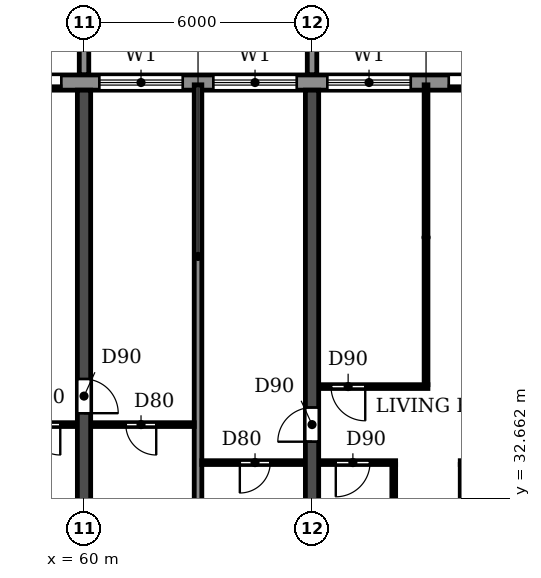
"""IFC4 building model, lengths in metres.
Left out: names, types, materials, properties, quantities, classifications, styles, units other than length and angle.
Written with IfcOpenShell. Run it as: python <this file> out.ifc"""

import sys

from ifc_helpers import new_model, si_unit, direction, frame, frame_2d, origin, place, context, subcontext, project, spatial, polyline, rectangle, outline, extrude, source, transform, mapped, element, fill, save


model = new_model("IFC4")
c1 = context("Model", 3, precision=1e-05, world=origin(), true_north=direction((0.0, 1.0)))
c2 = subcontext(c1, "Body", "Model", "MODEL_VIEW")
j1 = project(units=[si_unit("LENGTHUNIT", "METRE"), si_unit("PLANEANGLEUNIT", "RADIAN")], contexts=[c1])
p1 = place(None, origin())
s1 = spatial("IfcSite", under=j1, at=p1, CompositionType="ELEMENT")
p2 = place(p1, origin())
s2 = spatial("IfcBuilding", under=s1, at=p2, CompositionType="ELEMENT")
p3 = place(p2, frame((0.0, 0.0, 76.2)))
s3 = spatial("IfcBuildingStorey", under=s2, at=p3, CompositionType="ELEMENT", Elevation=76.2)
p4 = place(p3, frame((60.0, 30.525, 0.0), z_axis=(0.0, 0.0, 1.0), x_axis=(0.0, 1.0, 0.0)))
e1 = element("IfcWall", 1, at=p4, inside=s3, PredefinedType="SHEAR", context=c2, shape_type="SweptSolid", body=[
    extrude(rectangle(XDim=12.875, YDim=0.35, at=frame_2d((6.438, 0.0))), origin(), (0.0, 0.0, 1.0), 3.06),
])
p5 = place(p4, frame((4.375, 0.0, 0.0)))
e2 = element("IfcOpeningElement", 2, at=p5, cuts=e1, PredefinedType="OPENING", context=c2, shape_type="SweptSolid", body=[
    extrude(rectangle(XDim=0.9, YDim=2.1, at=frame_2d((0.45, 1.05))), frame((0.0, 0.185, 0.0), z_axis=(0.0, -1.0, 0.0), x_axis=(1.0, 0.0, 0.0)), (0.0, 0.0, 1.0), 0.37),
])
p6 = place(p3, frame((66.0, 30.525, 0.0), z_axis=(0.0, 0.0, 1.0), x_axis=(0.0, 1.0, 0.0)))
e3 = element("IfcWall", 3, at=p6, inside=s3, PredefinedType="SHEAR", context=c2, shape_type="SweptSolid", body=[
    extrude(rectangle(XDim=12.875, YDim=0.35, at=frame_2d((6.438, 0.0))), origin(), (0.0, 0.0, 1.0), 3.06),
])
p7 = place(p6, frame((3.625, 0.0, 0.0)))
e4 = element("IfcOpeningElement", 4, at=p7, cuts=e3, PredefinedType="OPENING", context=c2, shape_type="SweptSolid", body=[
    extrude(rectangle(XDim=0.9, YDim=2.1, at=frame_2d((0.45, 1.05))), frame((0.0, 0.185, 0.0), z_axis=(0.0, -1.0, 0.0), x_axis=(1.0, 0.0, 0.0)), (0.0, 0.0, 1.0), 0.37),
])
p8 = place(p3, frame((91.317, 43.6, 0.0), z_axis=(0.0, 0.0, 1.0), x_axis=(-1.0, 0.0, 0.0)))
e5 = element("IfcWall", 5, at=p8, inside=s3, PredefinedType="STANDARD", context=c2, shape_type="SweptSolid", body=[
    extrude(rectangle(XDim=80.634, YDim=0.4, at=frame_2d((40.317, 0.0))), origin(), (0.0, 0.0, 1.0), 3.06),
])
p9 = place(p8, frame((76.717, 0.0, 0.9)))
e6 = element("IfcOpeningElement", 6, at=p9, cuts=e5, PredefinedType="OPENING", context=c2, shape_type="SweptSolid", body=[
    extrude(rectangle(XDim=2.2, YDim=1.5, at=frame_2d((1.1, 0.75))), frame((0.0, 0.21, 0.0), z_axis=(0.0, -1.0, 0.0), x_axis=(1.0, 0.0, 0.0)), (0.0, 0.0, 1.0), 0.42),
])
p10 = place(p8, frame((73.917, 0.0, 0.0)))
e7 = element("IfcOpeningElement", 7, at=p10, cuts=e5, PredefinedType="OPENING", context=c2, shape_type="SweptSolid", body=[
    extrude(rectangle(XDim=1.8, YDim=2.4, at=frame_2d((0.9, 1.2))), frame((0.0, 0.21, 0.0), z_axis=(0.0, -1.0, 0.0), x_axis=(1.0, 0.0, 0.0)), (0.0, 0.0, 1.0), 0.42),
])
p11 = place(p8, frame((70.917, 0.0, 0.0)))
e8 = element("IfcOpeningElement", 8, at=p11, cuts=e5, PredefinedType="OPENING", context=c2, shape_type="SweptSolid", body=[
    extrude(rectangle(XDim=1.8, YDim=2.4, at=frame_2d((0.9, 1.2))), frame((0.0, 0.21, 0.0), z_axis=(0.0, -1.0, 0.0), x_axis=(1.0, 0.0, 0.0)), (0.0, 0.0, 1.0), 0.42),
])
p12 = place(p8, frame((67.717, 0.0, 0.9)))
e9 = element("IfcOpeningElement", 9, at=p12, cuts=e5, PredefinedType="OPENING", context=c2, shape_type="SweptSolid", body=[
    extrude(rectangle(XDim=2.2, YDim=1.5, at=frame_2d((1.1, 0.75))), frame((0.0, 0.21, 0.0), z_axis=(0.0, -1.0, 0.0), x_axis=(1.0, 0.0, 0.0)), (0.0, 0.0, 1.0), 0.42),
])
p13 = place(p8, frame((64.717, 0.0, 0.9)))
e10 = element("IfcOpeningElement", 10, at=p13, cuts=e5, PredefinedType="OPENING", context=c2, shape_type="SweptSolid", body=[
    extrude(rectangle(XDim=2.2, YDim=1.5, at=frame_2d((1.1, 0.75))), frame((0.0, 0.21, 0.0), z_axis=(0.0, -1.0, 0.0), x_axis=(1.0, 0.0, 0.0)), (0.0, 0.0, 1.0), 0.42),
])
p14 = place(p8, frame((61.917, 0.0, 0.0)))
e11 = element("IfcOpeningElement", 11, at=p14, cuts=e5, PredefinedType="OPENING", context=c2, shape_type="SweptSolid", body=[
    extrude(rectangle(XDim=1.8, YDim=2.4, at=frame_2d((0.9, 1.2))), frame((0.0, 0.21, 0.0), z_axis=(0.0, -1.0, 0.0), x_axis=(1.0, 0.0, 0.0)), (0.0, 0.0, 1.0), 0.42),
])
p15 = place(p8, frame((58.717, 0.0, 0.9)))
e12 = element("IfcOpeningElement", 12, at=p15, cuts=e5, PredefinedType="OPENING", context=c2, shape_type="SweptSolid", body=[
    extrude(rectangle(XDim=2.2, YDim=1.5, at=frame_2d((1.1, 0.75))), frame((0.0, 0.21, 0.0), z_axis=(0.0, -1.0, 0.0), x_axis=(1.0, 0.0, 0.0)), (0.0, 0.0, 1.0), 0.42),
])
p16 = place(p8, frame((55.917, 0.0, 0.0)))
e13 = element("IfcOpeningElement", 13, at=p16, cuts=e5, PredefinedType="OPENING", context=c2, shape_type="SweptSolid", body=[
    extrude(rectangle(XDim=1.8, YDim=2.4, at=frame_2d((0.9, 1.2))), frame((0.0, 0.21, 0.0), z_axis=(0.0, -1.0, 0.0), x_axis=(1.0, 0.0, 0.0)), (0.0, 0.0, 1.0), 0.42),
])
p17 = place(p8, frame((52.717, 0.0, 0.9)))
e14 = element("IfcOpeningElement", 14, at=p17, cuts=e5, PredefinedType="OPENING", context=c2, shape_type="SweptSolid", body=[
    extrude(rectangle(XDim=2.2, YDim=1.5, at=frame_2d((1.1, 0.75))), frame((0.0, 0.21, 0.0), z_axis=(0.0, -1.0, 0.0), x_axis=(1.0, 0.0, 0.0)), (0.0, 0.0, 1.0), 0.42),
])
p18 = place(p8, frame((49.717, 0.0, 0.9)))
e15 = element("IfcOpeningElement", 15, at=p18, cuts=e5, PredefinedType="OPENING", context=c2, shape_type="SweptSolid", body=[
    extrude(rectangle(XDim=2.2, YDim=1.5, at=frame_2d((1.1, 0.75))), frame((0.0, 0.21, 0.0), z_axis=(0.0, -1.0, 0.0), x_axis=(1.0, 0.0, 0.0)), (0.0, 0.0, 1.0), 0.42),
])
p19 = place(p8, frame((46.917, 0.0, 0.0)))
e16 = element("IfcOpeningElement", 16, at=p19, cuts=e5, PredefinedType="OPENING", context=c2, shape_type="SweptSolid", body=[
    extrude(rectangle(XDim=1.8, YDim=2.4, at=frame_2d((0.9, 1.2))), frame((0.0, 0.21, 0.0), z_axis=(0.0, -1.0, 0.0), x_axis=(1.0, 0.0, 0.0)), (0.0, 0.0, 1.0), 0.42),
])
p20 = place(p8, frame((43.717, 0.0, 0.9)))
e17 = element("IfcOpeningElement", 17, at=p20, cuts=e5, PredefinedType="OPENING", context=c2, shape_type="SweptSolid", body=[
    extrude(rectangle(XDim=2.2, YDim=1.5, at=frame_2d((1.1, 0.75))), frame((0.0, 0.21, 0.0), z_axis=(0.0, -1.0, 0.0), x_axis=(1.0, 0.0, 0.0)), (0.0, 0.0, 1.0), 0.42),
])
p21 = place(p8, frame((40.717, 0.0, 0.9)))
e18 = element("IfcOpeningElement", 18, at=p21, cuts=e5, PredefinedType="OPENING", context=c2, shape_type="SweptSolid", body=[
    extrude(rectangle(XDim=2.2, YDim=1.5, at=frame_2d((1.1, 0.75))), frame((0.0, 0.21, 0.0), z_axis=(0.0, -1.0, 0.0), x_axis=(1.0, 0.0, 0.0)), (0.0, 0.0, 1.0), 0.42),
])
p22 = place(p8, frame((37.917, 0.0, 0.0)))
e19 = element("IfcOpeningElement", 19, at=p22, cuts=e5, PredefinedType="OPENING", context=c2, shape_type="SweptSolid", body=[
    extrude(rectangle(XDim=1.8, YDim=2.4, at=frame_2d((0.9, 1.2))), frame((0.0, 0.21, 0.0), z_axis=(0.0, -1.0, 0.0), x_axis=(1.0, 0.0, 0.0)), (0.0, 0.0, 1.0), 0.42),
])
p23 = place(p8, frame((34.717, 0.0, 0.9)))
e20 = element("IfcOpeningElement", 20, at=p23, cuts=e5, PredefinedType="OPENING", context=c2, shape_type="SweptSolid", body=[
    extrude(rectangle(XDim=2.2, YDim=1.5, at=frame_2d((1.1, 0.75))), frame((0.0, 0.21, 0.0), z_axis=(0.0, -1.0, 0.0), x_axis=(1.0, 0.0, 0.0)), (0.0, 0.0, 1.0), 0.42),
])
p24 = place(p8, frame((31.917, 0.0, 0.0)))
e21 = element("IfcOpeningElement", 21, at=p24, cuts=e5, PredefinedType="OPENING", context=c2, shape_type="SweptSolid", body=[
    extrude(rectangle(XDim=1.8, YDim=2.4, at=frame_2d((0.9, 1.2))), frame((0.0, 0.21, 0.0), z_axis=(0.0, -1.0, 0.0), x_axis=(1.0, 0.0, 0.0)), (0.0, 0.0, 1.0), 0.42),
])
p25 = place(p8, frame((28.717, 0.0, 0.9)))
e22 = element("IfcOpeningElement", 22, at=p25, cuts=e5, PredefinedType="OPENING", context=c2, shape_type="SweptSolid", body=[
    extrude(rectangle(XDim=2.2, YDim=1.5, at=frame_2d((1.1, 0.75))), frame((0.0, 0.21, 0.0), z_axis=(0.0, -1.0, 0.0), x_axis=(1.0, 0.0, 0.0)), (0.0, 0.0, 1.0), 0.42),
])
p26 = place(p8, frame((25.717, 0.0, 0.9)))
e23 = element("IfcOpeningElement", 23, at=p26, cuts=e5, PredefinedType="OPENING", context=c2, shape_type="SweptSolid", body=[
    extrude(rectangle(XDim=2.2, YDim=1.5, at=frame_2d((1.1, 0.75))), frame((0.0, 0.21, 0.0), z_axis=(0.0, -1.0, 0.0), x_axis=(1.0, 0.0, 0.0)), (0.0, 0.0, 1.0), 0.42),
])
p27 = place(p8, frame((22.717, 0.0, 0.9)))
e24 = element("IfcOpeningElement", 24, at=p27, cuts=e5, PredefinedType="OPENING", context=c2, shape_type="SweptSolid", body=[
    extrude(rectangle(XDim=2.2, YDim=1.5, at=frame_2d((1.1, 0.75))), frame((0.0, 0.21, 0.0), z_axis=(0.0, -1.0, 0.0), x_axis=(1.0, 0.0, 0.0)), (0.0, 0.0, 1.0), 0.42),
])
p28 = place(p8, frame((19.917, 0.0, 0.0)))
e25 = element("IfcOpeningElement", 25, at=p28, cuts=e5, PredefinedType="OPENING", context=c2, shape_type="SweptSolid", body=[
    extrude(rectangle(XDim=1.8, YDim=2.4, at=frame_2d((0.9, 1.2))), frame((0.0, 0.21, 0.0), z_axis=(0.0, -1.0, 0.0), x_axis=(1.0, 0.0, 0.0)), (0.0, 0.0, 1.0), 0.42),
])
p29 = place(p8, frame((16.717, 0.0, 0.9)))
e26 = element("IfcOpeningElement", 26, at=p29, cuts=e5, PredefinedType="OPENING", context=c2, shape_type="SweptSolid", body=[
    extrude(rectangle(XDim=2.2, YDim=1.5, at=frame_2d((1.1, 0.75))), frame((0.0, 0.21, 0.0), z_axis=(0.0, -1.0, 0.0), x_axis=(1.0, 0.0, 0.0)), (0.0, 0.0, 1.0), 0.42),
])
p30 = place(p8, frame((13.717, 0.0, 0.9)))
e27 = element("IfcOpeningElement", 27, at=p30, cuts=e5, PredefinedType="OPENING", context=c2, shape_type="SweptSolid", body=[
    extrude(rectangle(XDim=2.2, YDim=1.5, at=frame_2d((1.1, 0.75))), frame((0.0, 0.21, 0.0), z_axis=(0.0, -1.0, 0.0), x_axis=(1.0, 0.0, 0.0)), (0.0, 0.0, 1.0), 0.42),
])
p31 = place(p8, frame((10.717, 0.0, 0.9)))
e28 = element("IfcOpeningElement", 28, at=p31, cuts=e5, PredefinedType="OPENING", context=c2, shape_type="SweptSolid", body=[
    extrude(rectangle(XDim=2.2, YDim=1.5, at=frame_2d((1.1, 0.75))), frame((0.0, 0.21, 0.0), z_axis=(0.0, -1.0, 0.0), x_axis=(1.0, 0.0, 0.0)), (0.0, 0.0, 1.0), 0.42),
])
p32 = place(p8, frame((7.917, 0.0, 0.0)))
e29 = element("IfcOpeningElement", 29, at=p32, cuts=e5, PredefinedType="OPENING", context=c2, shape_type="SweptSolid", body=[
    extrude(rectangle(XDim=1.8, YDim=2.4, at=frame_2d((0.9, 1.2))), frame((0.0, 0.21, 0.0), z_axis=(0.0, -1.0, 0.0), x_axis=(1.0, 0.0, 0.0)), (0.0, 0.0, 1.0), 0.42),
])
p33 = place(p8, frame((4.717, 0.0, 0.9)))
e30 = element("IfcOpeningElement", 30, at=p33, cuts=e5, PredefinedType="OPENING", context=c2, shape_type="SweptSolid", body=[
    extrude(rectangle(XDim=2.2, YDim=1.5, at=frame_2d((1.1, 0.75))), frame((0.0, 0.21, 0.0), z_axis=(0.0, -1.0, 0.0), x_axis=(1.0, 0.0, 0.0)), (0.0, 0.0, 1.0), 0.42),
])
p34 = place(p8, frame((1.917, 0.0, 0.0)))
e31 = element("IfcOpeningElement", 31, at=p34, cuts=e5, PredefinedType="OPENING", context=c2, shape_type="SweptSolid", body=[
    extrude(rectangle(XDim=1.8, YDim=2.4, at=frame_2d((0.9, 1.2))), frame((0.0, 0.21, 0.0), z_axis=(0.0, -1.0, 0.0), x_axis=(1.0, 0.0, 0.0)), (0.0, 0.0, 1.0), 0.42),
])
m1 = source(origin(), c2, "Body", "SweptSolid", [
    extrude(outline(polyline([(0.0, 0.0), (0.25, 0.0), (0.25, 3.1), (0.0, 3.1), (0.0, 0.0)])), origin(), (0.0, 0.0, 1.0), 3.1),
])
for number, where in (
    (32, (59.875, 43.8, 0.0)),
    (33, (65.875, 43.8, 0.0)),
):
    element("IfcWall", number, at=place(p3, frame(where)), inside=s3, PredefinedType="STANDARD", context=c2, shape_type="MappedRepresentation", body=[
        mapped(m1, transform((0.0, 0.0, 0.0))),
    ])
p35 = place(p3, frame((63.0, 30.535, 0.0), z_axis=(0.0, 0.0, 1.0), x_axis=(0.0, 1.0, 0.0)))
e34 = element("IfcWall", 34, at=p35, inside=s3, PredefinedType="PARTITIONING", context=c2, shape_type="SweptSolid", body=[
    extrude(rectangle(XDim=13.005, YDim=0.2, at=frame_2d((6.502, 0.0))), origin(), (0.0, 0.0, 1.0), 3.06),
])
p36 = place(p3, frame((63.1, 33.6, 0.0), z_axis=(0.0, 0.0, 1.0), x_axis=(1.0, 0.0, 0.0)))
e35 = element("IfcWall", 35, at=p36, inside=s3, PredefinedType="PARTITIONING", context=c2, shape_type="SweptSolid", body=[
    extrude(rectangle(XDim=2.715, YDim=0.1, at=frame_2d((1.357, 0.0))), origin(), (0.0, 0.0, 1.0), 3.06),
])
p37 = place(p36, frame((1.0, 0.0, 0.0)))
e36 = element("IfcOpeningElement", 36, at=p37, cuts=e35, PredefinedType="OPENING", context=c2, shape_type="SweptSolid", body=[
    extrude(rectangle(XDim=0.8, YDim=2.1, at=frame_2d((0.4, 1.05))), frame((0.0, 0.06, 0.0), z_axis=(0.0, -1.0, 0.0), x_axis=(1.0, 0.0, 0.0)), (0.0, 0.0, 1.0), 0.12),
])
p38 = place(p3, frame((66.185, 33.6, 0.0), z_axis=(0.0, 0.0, 1.0), x_axis=(1.0, 0.0, 0.0)))
e37 = element("IfcWall", 37, at=p38, inside=s3, PredefinedType="PARTITIONING", context=c2, shape_type="SweptSolid", body=[
    extrude(rectangle(XDim=2.015, YDim=0.1, at=frame_2d((1.007, 0.0))), origin(), (0.0, 0.0, 1.0), 3.06),
])
p39 = place(p38, frame((0.44, 0.0, 0.0)))
e38 = element("IfcOpeningElement", 38, at=p39, cuts=e37, PredefinedType="OPENING", context=c2, shape_type="SweptSolid", body=[
    extrude(rectangle(XDim=0.9, YDim=2.1, at=frame_2d((0.45, 1.05))), frame((0.0, 0.06, 0.0), z_axis=(0.0, -1.0, 0.0), x_axis=(1.0, 0.0, 0.0)), (0.0, 0.0, 1.0), 0.12),
])
p40 = place(p3, frame((69.9, 33.6, 0.0), z_axis=(0.0, 0.0, 1.0), x_axis=(1.0, 0.0, 0.0)))
e39 = element("IfcWall", 39, at=p40, inside=s3, PredefinedType="PARTITIONING", context=c2, shape_type="SweptSolid", body=[
    extrude(rectangle(XDim=1.915, YDim=0.1, at=frame_2d((0.958, 0.0))), origin(), (0.0, 0.0, 1.0), 3.06),
])
p41 = place(p40, frame((0.675, 0.0, 0.0)))
e40 = element("IfcOpeningElement", 40, at=p41, cuts=e39, PredefinedType="OPENING", context=c2, shape_type="SweptSolid", body=[
    extrude(rectangle(XDim=0.8, YDim=2.1, at=frame_2d((0.4, 1.05))), frame((0.0, 0.06, 0.0), z_axis=(0.0, -1.0, 0.0), x_axis=(1.0, 0.0, 0.0)), (0.0, 0.0, 1.0), 0.12),
])
p42 = place(p3, frame((57.9, 34.6, 0.0), z_axis=(0.0, 0.0, 1.0), x_axis=(1.0, 0.0, 0.0)))
e41 = element("IfcWall", 41, at=p42, inside=s3, PredefinedType="PARTITIONING", context=c2, shape_type="SweptSolid", body=[
    extrude(rectangle(XDim=1.915, YDim=0.1, at=frame_2d((0.958, 0.0))), origin(), (0.0, 0.0, 1.0), 3.06),
])
p43 = place(p42, frame((0.675, 0.0, 0.0)))
e42 = element("IfcOpeningElement", 42, at=p43, cuts=e41, PredefinedType="OPENING", context=c2, shape_type="SweptSolid", body=[
    extrude(rectangle(XDim=0.8, YDim=2.1, at=frame_2d((0.4, 1.05))), frame((0.0, 0.06, 0.0), z_axis=(0.0, -1.0, 0.0), x_axis=(1.0, 0.0, 0.0)), (0.0, 0.0, 1.0), 0.12),
])
p44 = place(p3, frame((60.185, 34.6, 0.0), z_axis=(0.0, 0.0, 1.0), x_axis=(1.0, 0.0, 0.0)))
e43 = element("IfcWall", 43, at=p44, inside=s3, PredefinedType="PARTITIONING", context=c2, shape_type="SweptSolid", body=[
    extrude(rectangle(XDim=2.715, YDim=0.1, at=frame_2d((1.357, 0.0))), origin(), (0.0, 0.0, 1.0), 3.06),
])
p45 = place(p44, frame((0.915, 0.0, 0.0)))
e44 = element("IfcOpeningElement", 44, at=p45, cuts=e43, PredefinedType="OPENING", context=c2, shape_type="SweptSolid", body=[
    extrude(rectangle(XDim=0.8, YDim=2.1, at=frame_2d((0.4, 1.05))), frame((0.0, 0.06, 0.0), z_axis=(0.0, -1.0, 0.0), x_axis=(1.0, 0.0, 0.0)), (0.0, 0.0, 1.0), 0.12),
])
p46 = place(p3, frame((66.185, 35.6, 0.0), z_axis=(0.0, 0.0, 1.0), x_axis=(1.0, 0.0, 0.0)))
e45 = element("IfcWall", 45, at=p46, inside=s3, PredefinedType="PARTITIONING", context=c2, shape_type="SweptSolid", body=[
    extrude(rectangle(XDim=2.865, YDim=0.1, at=frame_2d((1.433, 0.0))), origin(), (0.0, 0.0, 1.0), 3.06),
])
p47 = place(p46, frame((0.315, 0.0, 0.0)))
e46 = element("IfcOpeningElement", 46, at=p47, cuts=e45, PredefinedType="OPENING", context=c2, shape_type="SweptSolid", body=[
    extrude(rectangle(XDim=0.9, YDim=2.1, at=frame_2d((0.45, 1.05))), frame((0.0, 0.06, 0.0), z_axis=(0.0, -1.0, 0.0), x_axis=(1.0, 0.0, 0.0)), (0.0, 0.0, 1.0), 0.12),
])
p48 = place(p3, frame((68.15, 30.535, 0.0), z_axis=(0.0, 0.0, 1.0), x_axis=(0.0, 1.0, 0.0)))
e47 = element("IfcWall", 47, at=p48, inside=s3, PredefinedType="PARTITIONING", context=c2, shape_type="SweptSolid", body=[
    extrude(rectangle(XDim=3.015, YDim=0.1, at=frame_2d((1.508, 0.0))), origin(), (0.0, 0.0, 1.0), 3.06),
])
p49 = place(p3, frame((69.0, 35.65, 0.0), z_axis=(0.0, 0.0, 1.0), x_axis=(0.0, 1.0, 0.0)))
e48 = element("IfcWall", 48, at=p49, inside=s3, PredefinedType="PARTITIONING", context=c2, shape_type="SweptSolid", body=[
    extrude(rectangle(XDim=7.89, YDim=0.1, at=frame_2d((3.945, 0.0))), origin(), (0.0, 0.0, 1.0), 3.06),
])
p50 = place(p3, frame((69.95, 30.535, 0.0), z_axis=(0.0, 0.0, 1.0), x_axis=(0.0, 1.0, 0.0)))
e49 = element("IfcWall", 49, at=p50, inside=s3, PredefinedType="PARTITIONING", context=c2, shape_type="SweptSolid", body=[
    extrude(rectangle(XDim=3.015, YDim=0.1, at=frame_2d((1.508, 0.0))), origin(), (0.0, 0.0, 1.0), 3.06),
])
p51 = place(p24, origin())
e50 = element("IfcDoor", 50, at=p51, inside=s3, OperationType="DOUBLE_DOOR_SLIDING", PredefinedType="DOOR", context=c2, shape_type="SweptSolid", body=[
    extrude(rectangle(XDim=1.8, YDim=2.4, at=frame_2d((0.9, 1.2))), frame((0.0, 0.025, 0.0), z_axis=(0.0, -1.0, 0.0), x_axis=(1.0, 0.0, 0.0)), (0.0, 0.0, 1.0), 0.05),
])
fill(e21, e50)
p52 = place(p25, origin())
e51 = element("IfcWindow", 51, at=p52, inside=s3, PartitioningType="DOUBLE_PANEL_HORIZONTAL", PredefinedType="WINDOW", context=c2, shape_type="SweptSolid", body=[
    extrude(rectangle(XDim=2.2, YDim=1.5, at=frame_2d((1.1, 0.75))), frame((0.0, 0.03, 0.0), z_axis=(0.0, -1.0, 0.0), x_axis=(1.0, 0.0, 0.0)), (0.0, 0.0, 1.0), 0.06),
])
fill(e22, e51)
p53 = place(p26, origin())
e52 = element("IfcWindow", 52, at=p53, inside=s3, PartitioningType="DOUBLE_PANEL_HORIZONTAL", PredefinedType="WINDOW", context=c2, shape_type="SweptSolid", body=[
    extrude(rectangle(XDim=2.2, YDim=1.5, at=frame_2d((1.1, 0.75))), frame((0.0, 0.03, 0.0), z_axis=(0.0, -1.0, 0.0), x_axis=(1.0, 0.0, 0.0)), (0.0, 0.0, 1.0), 0.06),
])
fill(e23, e52)
p54 = place(p27, origin())
e53 = element("IfcWindow", 53, at=p54, inside=s3, PartitioningType="DOUBLE_PANEL_HORIZONTAL", PredefinedType="WINDOW", context=c2, shape_type="SweptSolid", body=[
    extrude(rectangle(XDim=2.2, YDim=1.5, at=frame_2d((1.1, 0.75))), frame((0.0, 0.03, 0.0), z_axis=(0.0, -1.0, 0.0), x_axis=(1.0, 0.0, 0.0)), (0.0, 0.0, 1.0), 0.06),
])
fill(e24, e53)
p55 = place(p28, origin())
e54 = element("IfcDoor", 54, at=p55, inside=s3, OperationType="DOUBLE_DOOR_SLIDING", PredefinedType="DOOR", context=c2, shape_type="SweptSolid", body=[
    extrude(rectangle(XDim=1.8, YDim=2.4, at=frame_2d((0.9, 1.2))), frame((0.0, 0.025, 0.0), z_axis=(0.0, -1.0, 0.0), x_axis=(1.0, 0.0, 0.0)), (0.0, 0.0, 1.0), 0.05),
])
fill(e25, e54)
p56 = place(p45, frame((0.8, 0.0, 0.0), z_axis=(0.0, 0.0, 1.0), x_axis=(-1.0, 0.0, 0.0)))
e55 = element("IfcDoor", 55, at=p56, inside=s3, OperationType="SINGLE_SWING_LEFT", PredefinedType="DOOR", context=c2, shape_type="SweptSolid", body=[
    extrude(rectangle(XDim=0.8, YDim=2.1, at=frame_2d((0.4, 1.05))), frame((0.0, 0.025, 0.0), z_axis=(0.0, -1.0, 0.0), x_axis=(1.0, 0.0, 0.0)), (0.0, 0.0, 1.0), 0.05),
])
fill(e44, e55)
p57 = place(p43, frame((0.8, 0.0, 0.0), z_axis=(0.0, 0.0, 1.0), x_axis=(-1.0, 0.0, 0.0)))
e56 = element("IfcDoor", 56, at=p57, inside=s3, OperationType="SINGLE_SWING_LEFT", PredefinedType="DOOR", context=c2, shape_type="SweptSolid", body=[
    extrude(rectangle(XDim=0.8, YDim=2.1, at=frame_2d((0.4, 1.05))), frame((0.0, 0.025, 0.0), z_axis=(0.0, -1.0, 0.0), x_axis=(1.0, 0.0, 0.0)), (0.0, 0.0, 1.0), 0.05),
])
fill(e42, e56)
p58 = place(p5, frame((0.9, 0.0, 0.0), z_axis=(0.0, 0.0, 1.0), x_axis=(-1.0, 0.0, 0.0)))
e57 = element("IfcDoor", 57, at=p58, inside=s3, OperationType="SINGLE_SWING_RIGHT", PredefinedType="DOOR", context=c2, shape_type="SweptSolid", body=[
    extrude(rectangle(XDim=0.9, YDim=2.1, at=frame_2d((0.45, 1.05))), frame((0.0, 0.025, 0.0), z_axis=(0.0, -1.0, 0.0), x_axis=(1.0, 0.0, 0.0)), (0.0, 0.0, 1.0), 0.05),
])
fill(e2, e57)
p59 = place(p37, frame((0.8, 0.0, 0.0), z_axis=(0.0, 0.0, 1.0), x_axis=(-1.0, 0.0, 0.0)))
e58 = element("IfcDoor", 58, at=p59, inside=s3, OperationType="SINGLE_SWING_RIGHT", PredefinedType="DOOR", context=c2, shape_type="SweptSolid", body=[
    extrude(rectangle(XDim=0.8, YDim=2.1, at=frame_2d((0.4, 1.05))), frame((0.0, 0.025, 0.0), z_axis=(0.0, -1.0, 0.0), x_axis=(1.0, 0.0, 0.0)), (0.0, 0.0, 1.0), 0.05),
])
fill(e36, e58)
p60 = place(p7, origin())
e59 = element("IfcDoor", 59, at=p60, inside=s3, OperationType="SINGLE_SWING_LEFT", PredefinedType="DOOR", context=c2, shape_type="SweptSolid", body=[
    extrude(rectangle(XDim=0.9, YDim=2.1, at=frame_2d((0.45, 1.05))), frame((0.0, 0.025, 0.0), z_axis=(0.0, -1.0, 0.0), x_axis=(1.0, 0.0, 0.0)), (0.0, 0.0, 1.0), 0.05),
])
fill(e4, e59)
p61 = place(p47, frame((0.9, 0.0, 0.0), z_axis=(0.0, 0.0, 1.0), x_axis=(-1.0, 0.0, 0.0)))
e60 = element("IfcDoor", 60, at=p61, inside=s3, OperationType="SINGLE_SWING_LEFT", PredefinedType="DOOR", context=c2, shape_type="SweptSolid", body=[
    extrude(rectangle(XDim=0.9, YDim=2.1, at=frame_2d((0.45, 1.05))), frame((0.0, 0.025, 0.0), z_axis=(0.0, -1.0, 0.0), x_axis=(1.0, 0.0, 0.0)), (0.0, 0.0, 1.0), 0.05),
])
fill(e46, e60)
p62 = place(p39, frame((0.9, 0.0, 0.0), z_axis=(0.0, 0.0, 1.0), x_axis=(-1.0, 0.0, 0.0)))
e61 = element("IfcDoor", 61, at=p62, inside=s3, OperationType="SINGLE_SWING_RIGHT", PredefinedType="DOOR", context=c2, shape_type="SweptSolid", body=[
    extrude(rectangle(XDim=0.9, YDim=2.1, at=frame_2d((0.45, 1.05))), frame((0.0, 0.025, 0.0), z_axis=(0.0, -1.0, 0.0), x_axis=(1.0, 0.0, 0.0)), (0.0, 0.0, 1.0), 0.05),
])
fill(e38, e61)
save(model, sys.argv[1])
